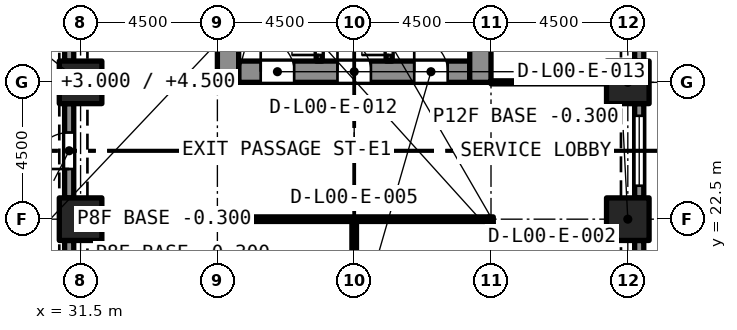
"""IFC4 building model, lengths in metres.
Left out: names, types, materials, properties, quantities, classifications, styles, units other than length and angle.
Written with IfcOpenShell. Run it as: python <this file> out.ifc"""

import sys

from ifc_helpers import new_model, si_unit, direction, frame, frame_2d, origin, origin_2d, place, context, subcontext, project, spatial, rectangle, extrude, element, fill, save


model = new_model("IFC4")
c1 = context("Model", 3, precision=1e-05, world=origin(), true_north=direction((0.0, 1.0)))
c2 = subcontext(c1, "Body", "Model", "MODEL_VIEW")
j1 = project(units=[si_unit("LENGTHUNIT", "METRE"), si_unit("PLANEANGLEUNIT", "RADIAN")], contexts=[c1])
p1 = place(None, origin())
s1 = spatial("IfcSite", under=j1, at=p1, CompositionType="ELEMENT")
p2 = place(p1, origin())
s2 = spatial("IfcBuilding", under=s1, at=p2, CompositionType="ELEMENT")
p3 = place(p2, origin())
s3 = spatial("IfcBuildingStorey", under=s2, at=p3, CompositionType="ELEMENT", Elevation=0.0)
for number, where, z_axis, x_axis in (
    (1, (31.5, 22.5, -0.3), (0.0, 0.0, 1.0), (1.0, 0.0, 0.0)),
    (2, (49.5, 22.5, -0.3), (0.0, 0.0, 1.0), (1.0, 0.0, 0.0)),
    (3, (31.5, 27.0, -0.3), (0.0, 0.0, 1.0), (1.0, 0.0, 0.0)),
    (4, (49.5, 27.0, -0.3), (0.0, 0.0, 1.0), (1.0, 0.0, 0.0)),
):
    element("IfcColumn", number, at=place(p3, frame(where, z_axis=z_axis, x_axis=x_axis)), inside=s3, PredefinedType="COLUMN", context=c2, shape_type="SweptSolid", body=[
        extrude(rectangle(XDim=1.4, YDim=1.4, at=origin_2d()), origin(), (0.0, 0.0, 1.0), 6.3),
    ])
p4 = place(p3, frame((36.7, 27.35, -0.3), z_axis=(0.0, 0.0, 1.0), x_axis=(1.0, 0.0, 0.0)))
e5 = element("IfcWall", 5, at=p4, inside=s3, PredefinedType="SOLIDWALL", context=c2, shape_type="SweptSolid", body=[
    extrude(rectangle(XDim=7.6, YDim=0.7, at=frame_2d((3.8, 0.0))), origin(), (0.0, 0.0, 1.0), 6.3),
])
p5 = place(p4, frame((5.775, 0.0, 0.3)))
e6 = element("IfcOpeningElement", 6, at=p5, cuts=e5, PredefinedType="OPENING", context=c2, shape_type="SweptSolid", body=[
    extrude(rectangle(XDim=1.1, YDim=2.1, at=frame_2d((0.55, 1.05))), frame((0.0, 0.36, 0.0), z_axis=(0.0, -1.0, 0.0), x_axis=(1.0, 0.0, 0.0)), (0.0, 0.0, 1.0), 0.72),
])
p6 = place(p4, frame((3.25, 0.0, 0.3)))
e7 = element("IfcOpeningElement", 7, at=p6, cuts=e5, PredefinedType="OPENING", context=c2, shape_type="SweptSolid", body=[
    extrude(rectangle(XDim=1.1, YDim=2.1, at=frame_2d((0.55, 1.05))), frame((0.0, 0.36, 0.0), z_axis=(0.0, -1.0, 0.0), x_axis=(1.0, 0.0, 0.0)), (0.0, 0.0, 1.0), 0.72),
])
p7 = place(p4, frame((0.725, 0.0, 0.3)))
e8 = element("IfcOpeningElement", 8, at=p7, cuts=e5, PredefinedType="OPENING", context=c2, shape_type="SweptSolid", body=[
    extrude(rectangle(XDim=1.1, YDim=2.1, at=frame_2d((0.55, 1.05))), frame((0.0, 0.36, 0.0), z_axis=(0.0, -1.0, 0.0), x_axis=(1.0, 0.0, 0.0)), (0.0, 0.0, 1.0), 0.72),
])
p8 = place(p3, frame((36.35, 27.0, -0.3), z_axis=(0.0, 0.0, 1.0), x_axis=(0.0, 1.0, 0.0)))
e9 = element("IfcWall", 9, at=p8, inside=s3, PredefinedType="SOLIDWALL", context=c2, shape_type="SweptSolid", body=[
    extrude(rectangle(XDim=13.5, YDim=0.7, at=frame_2d((6.75, 0.0))), origin(), (0.0, 0.0, 1.0), 6.3),
])
p9 = place(p8, frame((8.95, 0.0, 0.3)))
e10 = element("IfcOpeningElement", 10, at=p9, cuts=e9, PredefinedType="OPENING", context=c2, shape_type="SweptSolid", body=[
    extrude(rectangle(XDim=1.2, YDim=2.1, at=frame_2d((0.6, 1.05))), frame((0.0, 0.36, 0.0), z_axis=(0.0, -1.0, 0.0), x_axis=(1.0, 0.0, 0.0)), (0.0, 0.0, 1.0), 0.72),
])
p10 = place(p3, frame((44.65, 27.0, -0.3), z_axis=(0.0, 0.0, 1.0), x_axis=(0.0, 1.0, 0.0)))
e11 = element("IfcWall", 11, at=p10, inside=s3, PredefinedType="SOLIDWALL", context=c2, shape_type="SweptSolid", body=[
    extrude(rectangle(XDim=13.5, YDim=0.7, at=frame_2d((6.75, 0.0))), origin(), (0.0, 0.0, 1.0), 6.3),
])
p11 = place(p10, frame((8.95, 0.0, 0.3)))
e12 = element("IfcOpeningElement", 12, at=p11, cuts=e11, PredefinedType="OPENING", context=c2, shape_type="SweptSolid", body=[
    extrude(rectangle(XDim=1.2, YDim=2.1, at=frame_2d((0.6, 1.05))), frame((0.0, 0.36, 0.0), z_axis=(0.0, -1.0, 0.0), x_axis=(1.0, 0.0, 0.0)), (0.0, 0.0, 1.0), 0.72),
])
p12 = place(p3, frame((49.875, 21.8, 0.0), z_axis=(0.0, 0.0, 1.0), x_axis=(0.0, -1.0, 0.0)))
e13 = element("IfcWall", 13, at=p12, inside=s3, PredefinedType="SOLIDWALL", context=c2, shape_type="SweptSolid", body=[
    extrude(rectangle(XDim=3.1, YDim=0.3, at=frame_2d((1.55, 0.0))), origin(), (0.0, 0.0, 1.0), 6.0),
])
p13 = place(p12, frame((0.4, 0.0, 0.45)))
e14 = element("IfcOpeningElement", 14, at=p13, cuts=e13, PredefinedType="OPENING", context=c2, shape_type="SweptSolid", body=[
    extrude(rectangle(XDim=2.3, YDim=3.3, at=frame_2d((1.15, 1.65))), frame((0.0, 0.16, 0.0), z_axis=(0.0, -1.0, 0.0), x_axis=(1.0, 0.0, 0.0)), (0.0, 0.0, 1.0), 0.32),
])
p14 = place(p3, frame((49.875, 26.3, 0.0), z_axis=(0.0, 0.0, 1.0), x_axis=(0.0, -1.0, 0.0)))
e15 = element("IfcWall", 15, at=p14, inside=s3, PredefinedType="SOLIDWALL", context=c2, shape_type="SweptSolid", body=[
    extrude(rectangle(XDim=3.1, YDim=0.3, at=frame_2d((1.55, 0.0))), origin(), (0.0, 0.0, 1.0), 6.0),
])
p15 = place(p14, frame((0.4, 0.0, 0.45)))
e16 = element("IfcOpeningElement", 16, at=p15, cuts=e15, PredefinedType="OPENING", context=c2, shape_type="SweptSolid", body=[
    extrude(rectangle(XDim=2.3, YDim=3.3, at=frame_2d((1.15, 1.65))), frame((0.0, 0.16, 0.0), z_axis=(0.0, -1.0, 0.0), x_axis=(1.0, 0.0, 0.0)), (0.0, 0.0, 1.0), 0.32),
])
p16 = place(p3, frame((49.875, 30.8, 0.0), z_axis=(0.0, 0.0, 1.0), x_axis=(0.0, -1.0, 0.0)))
e17 = element("IfcWall", 17, at=p16, inside=s3, PredefinedType="SOLIDWALL", context=c2, shape_type="SweptSolid", body=[
    extrude(rectangle(XDim=3.1, YDim=0.3, at=frame_2d((1.55, 0.0))), origin(), (0.0, 0.0, 1.0), 6.0),
])
p17 = place(p16, frame((0.4, 0.0, 0.45)))
e18 = element("IfcOpeningElement", 18, at=p17, cuts=e17, PredefinedType="OPENING", context=c2, shape_type="SweptSolid", body=[
    extrude(rectangle(XDim=2.3, YDim=3.3, at=frame_2d((1.15, 1.65))), frame((0.0, 0.16, 0.0), z_axis=(0.0, -1.0, 0.0), x_axis=(1.0, 0.0, 0.0)), (0.0, 0.0, 1.0), 0.32),
])
p18 = place(p3, frame((31.125, 27.7, 0.0), z_axis=(0.0, 0.0, 1.0), x_axis=(0.0, 1.0, 0.0)))
e19 = element("IfcWall", 19, at=p18, inside=s3, PredefinedType="SOLIDWALL", context=c2, shape_type="SweptSolid", body=[
    extrude(rectangle(XDim=3.1, YDim=0.3, at=frame_2d((1.55, 0.0))), origin(), (0.0, 0.0, 1.0), 6.0),
])
p19 = place(p18, frame((0.95, 0.0, 0.0)))
e20 = element("IfcOpeningElement", 20, at=p19, cuts=e19, PredefinedType="OPENING", context=c2, shape_type="SweptSolid", body=[
    extrude(rectangle(XDim=1.2, YDim=2.4, at=frame_2d((0.6, 1.2))), frame((0.0, 0.16, 0.0), z_axis=(0.0, -1.0, 0.0), x_axis=(1.0, 0.0, 0.0)), (0.0, 0.0, 1.0), 0.32),
])
p20 = place(p3, frame((31.125, 23.2, 0.0), z_axis=(0.0, 0.0, 1.0), x_axis=(0.0, 1.0, 0.0)))
e21 = element("IfcWall", 21, at=p20, inside=s3, PredefinedType="SOLIDWALL", context=c2, shape_type="SweptSolid", body=[
    extrude(rectangle(XDim=3.1, YDim=0.3, at=frame_2d((1.55, 0.0))), origin(), (0.0, 0.0, 1.0), 6.0),
])
p21 = place(p20, frame((0.95, 0.0, 0.0)))
e22 = element("IfcOpeningElement", 22, at=p21, cuts=e21, PredefinedType="OPENING", context=c2, shape_type="SweptSolid", body=[
    extrude(rectangle(XDim=1.2, YDim=2.4, at=frame_2d((0.6, 1.2))), frame((0.0, 0.16, 0.0), z_axis=(0.0, -1.0, 0.0), x_axis=(1.0, 0.0, 0.0)), (0.0, 0.0, 1.0), 0.32),
])
p22 = place(p3, frame((31.125, 18.7, 0.0), z_axis=(0.0, 0.0, 1.0), x_axis=(0.0, 1.0, 0.0)))
e23 = element("IfcWall", 23, at=p22, inside=s3, PredefinedType="SOLIDWALL", context=c2, shape_type="SweptSolid", body=[
    extrude(rectangle(XDim=3.1, YDim=0.3, at=frame_2d((1.55, 0.0))), origin(), (0.0, 0.0, 1.0), 6.0),
])
p23 = place(p22, frame((0.65, 0.0, 0.0)))
e24 = element("IfcOpeningElement", 24, at=p23, cuts=e23, PredefinedType="OPENING", context=c2, shape_type="SweptSolid", body=[
    extrude(rectangle(XDim=1.8, YDim=2.4, at=frame_2d((0.9, 1.2))), frame((0.0, 0.16, 0.0), z_axis=(0.0, -1.0, 0.0), x_axis=(1.0, 0.0, 0.0)), (0.0, 0.0, 1.0), 0.32),
])
p24 = place(p3, frame((50.5, 9.3, 0.0), z_axis=(0.0, 0.0, 1.0), x_axis=(0.0, 1.0, 0.0)))
e25 = element("IfcWall", 25, at=p24, inside=s3, PredefinedType="SOLIDWALL", context=c2, shape_type="SweptSolid", body=[
    extrude(rectangle(XDim=35.4, YDim=0.3, at=frame_2d((17.7, 0.0))), origin(), (0.0, 0.0, 1.0), 5.7),
])
p25 = place(p3, frame((41.65, 27.7, 0.0), z_axis=(0.0, 0.0, 1.0), x_axis=(0.0, 1.0, 0.0)))
e26 = element("IfcWall", 26, at=p25, inside=s3, PredefinedType="SOLIDWALL", context=c2, shape_type="SweptSolid", body=[
    extrude(rectangle(XDim=5.4, YDim=0.2, at=frame_2d((2.7, 0.0))), origin(), (0.0, 0.0, 1.0), 5.65),
])
p26 = place(p25, frame((0.2, 0.0, 0.0)))
e27 = element("IfcOpeningElement", 27, at=p26, cuts=e26, PredefinedType="OPENING", context=c2, shape_type="SweptSolid", body=[
    extrude(rectangle(XDim=0.9, YDim=2.1, at=frame_2d((0.45, 1.05))), frame((0.0, 0.11, 0.0), z_axis=(0.0, -1.0, 0.0), x_axis=(1.0, 0.0, 0.0)), (0.0, 0.0, 1.0), 0.22),
])
p27 = place(p3, frame((39.35, 27.7, 0.0), z_axis=(0.0, 0.0, 1.0), x_axis=(0.0, 1.0, 0.0)))
e28 = element("IfcWall", 28, at=p27, inside=s3, PredefinedType="SOLIDWALL", context=c2, shape_type="SweptSolid", body=[
    extrude(rectangle(XDim=5.4, YDim=0.2, at=frame_2d((2.7, 0.0))), origin(), (0.0, 0.0, 1.0), 5.65),
])
p28 = place(p27, frame((0.2, 0.0, 0.0)))
e29 = element("IfcOpeningElement", 29, at=p28, cuts=e28, PredefinedType="OPENING", context=c2, shape_type="SweptSolid", body=[
    extrude(rectangle(XDim=0.9, YDim=2.1, at=frame_2d((0.45, 1.05))), frame((0.0, 0.11, 0.0), z_axis=(0.0, -1.0, 0.0), x_axis=(1.0, 0.0, 0.0)), (0.0, 0.0, 1.0), 0.22),
])
p29 = place(p3, frame((45.0, 27.0, 0.0), z_axis=(0.0, 0.0, 1.0), x_axis=(1.0, 0.0, 0.0)))
e30 = element("IfcWall", 30, at=p29, inside=s3, PredefinedType="PARTITIONING", context=c2, shape_type="SweptSolid", body=[
    extrude(rectangle(XDim=3.8, YDim=0.1, at=frame_2d((1.9, 0.0))), origin(), (0.0, 0.0, 1.0), 5.65),
])
p30 = place(p3, frame((45.0, 13.5, 0.0), z_axis=(0.0, 0.0, 1.0), x_axis=(0.0, 1.0, 0.0)))
e31 = element("IfcWall", 31, at=p30, inside=s3, PredefinedType="PARTITIONING", context=c2, shape_type="SweptSolid", body=[
    extrude(rectangle(XDim=9.075, YDim=0.15, at=frame_2d((4.538, 0.0))), origin(), (0.0, 0.0, 1.0), 5.65),
])
p31 = place(p30, frame((4.0, 0.0, 0.0)))
e32 = element("IfcOpeningElement", 32, at=p31, cuts=e31, PredefinedType="OPENING", context=c2, shape_type="SweptSolid", body=[
    extrude(rectangle(XDim=1.0, YDim=2.1, at=frame_2d((0.5, 1.05))), frame((0.0, 0.085, 0.0), z_axis=(0.0, -1.0, 0.0), x_axis=(1.0, 0.0, 0.0)), (0.0, 0.0, 1.0), 0.17),
])
p32 = place(p3, frame((40.5, 13.575, 0.0), z_axis=(0.0, 0.0, 1.0), x_axis=(0.0, 1.0, 0.0)))
e33 = element("IfcWall", 33, at=p32, inside=s3, PredefinedType="PARTITIONING", context=c2, shape_type="SweptSolid", body=[
    extrude(rectangle(XDim=8.85, YDim=0.15, at=frame_2d((4.425, 0.0))), origin(), (0.0, 0.0, 1.0), 5.65),
])
p33 = place(p3, frame((32.2, 22.5, 0.0), z_axis=(0.0, 0.0, 1.0), x_axis=(1.0, 0.0, 0.0)))
e34 = element("IfcWall", 34, at=p33, inside=s3, PredefinedType="PARTITIONING", context=c2, shape_type="SweptSolid", body=[
    extrude(rectangle(XDim=12.725, YDim=0.15, at=frame_2d((6.363, 0.0))), origin(), (0.0, 0.0, 1.0), 5.65),
])
p34 = place(p3, frame((32.2, 27.0, 0.0), z_axis=(0.0, 0.0, 1.0), x_axis=(1.0, 0.0, 0.0)))
e35 = element("IfcWall", 35, at=p34, inside=s3, PredefinedType="PARTITIONING", context=c2, shape_type="SweptSolid", body=[
    extrude(rectangle(XDim=3.8, YDim=0.1, at=frame_2d((1.9, 0.0))), origin(), (0.0, 0.0, 1.0), 5.65),
])
p35 = place(p15, origin())
e36 = element("IfcWindow", 36, at=p35, inside=s3, PartitioningType="SINGLE_PANEL", PredefinedType="WINDOW", context=c2, shape_type="SweptSolid", body=[
    extrude(rectangle(XDim=2.3, YDim=3.3, at=frame_2d((1.15, 1.65))), frame((0.0, 0.03, 0.0), z_axis=(0.0, -1.0, 0.0), x_axis=(1.0, 0.0, 0.0)), (0.0, 0.0, 1.0), 0.06),
])
fill(e16, e36)
p36 = place(p21, origin())
e37 = element("IfcDoor", 37, at=p36, inside=s3, OperationType="SINGLE_SWING_LEFT", PredefinedType="DOOR", context=c2, shape_type="SweptSolid", body=[
    extrude(rectangle(XDim=1.2, YDim=2.4, at=frame_2d((0.6, 1.2))), frame((0.0, 0.025, 0.0), z_axis=(0.0, -1.0, 0.0), x_axis=(1.0, 0.0, 0.0)), (0.0, 0.0, 1.0), 0.05),
])
fill(e22, e37)
p37 = place(p26, origin())
e38 = element("IfcDoor", 38, at=p37, inside=s3, OperationType="SINGLE_SWING_LEFT", PredefinedType="DOOR", context=c2, shape_type="SweptSolid", body=[
    extrude(rectangle(XDim=0.9, YDim=2.1, at=frame_2d((0.45, 1.05))), frame((0.0, 0.025, 0.0), z_axis=(0.0, -1.0, 0.0), x_axis=(1.0, 0.0, 0.0)), (0.0, 0.0, 1.0), 0.05),
])
fill(e27, e38)
p38 = place(p28, origin())
e39 = element("IfcDoor", 39, at=p38, inside=s3, OperationType="SINGLE_SWING_LEFT", PredefinedType="DOOR", context=c2, shape_type="SweptSolid", body=[
    extrude(rectangle(XDim=0.9, YDim=2.1, at=frame_2d((0.45, 1.05))), frame((0.0, 0.025, 0.0), z_axis=(0.0, -1.0, 0.0), x_axis=(1.0, 0.0, 0.0)), (0.0, 0.0, 1.0), 0.05),
])
fill(e29, e39)
p39 = place(p5, origin())
e40 = element("IfcDoor", 40, at=p39, inside=s3, OperationType="SINGLE_SWING_LEFT", PredefinedType="DOOR", context=c2, shape_type="SweptSolid", body=[
    extrude(rectangle(XDim=1.1, YDim=2.1, at=frame_2d((0.55, 1.05))), frame((0.0, 0.025, 0.0), z_axis=(0.0, -1.0, 0.0), x_axis=(1.0, 0.0, 0.0)), (0.0, 0.0, 1.0), 0.05),
])
fill(e6, e40)
p40 = place(p6, origin())
e41 = element("IfcDoor", 41, at=p40, inside=s3, OperationType="SINGLE_SWING_LEFT", PredefinedType="DOOR", context=c2, shape_type="SweptSolid", body=[
    extrude(rectangle(XDim=1.1, YDim=2.1, at=frame_2d((0.55, 1.05))), frame((0.0, 0.025, 0.0), z_axis=(0.0, -1.0, 0.0), x_axis=(1.0, 0.0, 0.0)), (0.0, 0.0, 1.0), 0.05),
])
fill(e7, e41)
p41 = place(p7, origin())
e42 = element("IfcDoor", 42, at=p41, inside=s3, OperationType="SINGLE_SWING_LEFT", PredefinedType="DOOR", context=c2, shape_type="SweptSolid", body=[
    extrude(rectangle(XDim=1.1, YDim=2.1, at=frame_2d((0.55, 1.05))), frame((0.0, 0.025, 0.0), z_axis=(0.0, -1.0, 0.0), x_axis=(1.0, 0.0, 0.0)), (0.0, 0.0, 1.0), 0.05),
])
fill(e8, e42)
save(model, sys.argv[1])
